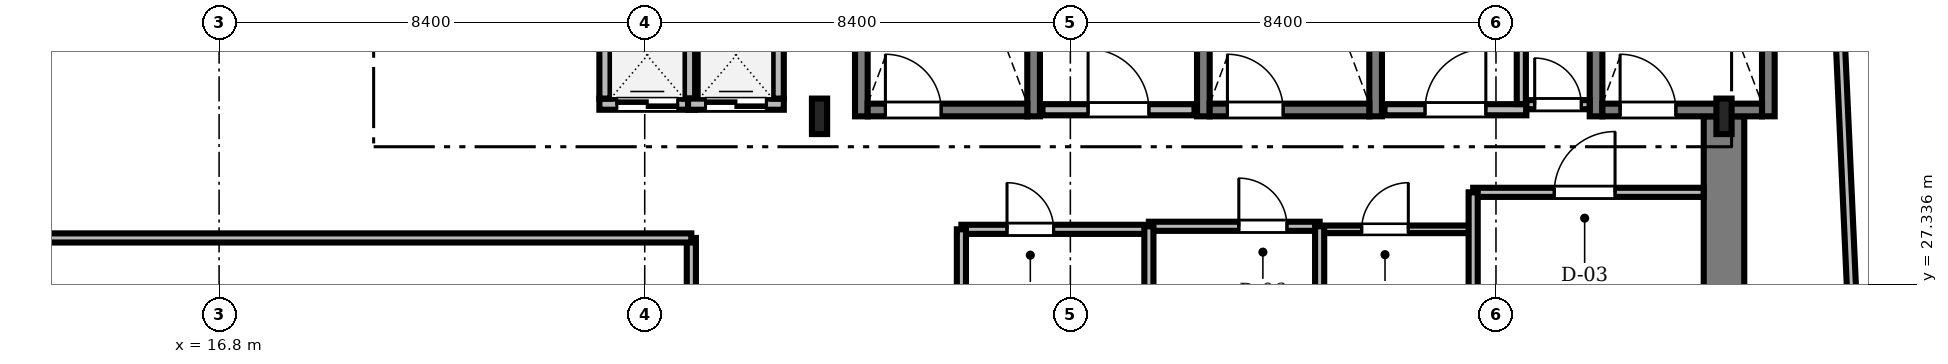
"""IFC4 building model, lengths in metres.
Left out: names, types, materials, properties, quantities, classifications, styles, units other than length and angle.
Written with IfcOpenShell. Run it as: python <this file> out.ifc"""

import sys

from ifc_helpers import new_model, si_unit, direction, frame, frame_2d, origin, origin_2d, place, context, subcontext, project, spatial, rectangle, i_section, extrude, source, transform, mapped, element, fill, save


model = new_model("IFC4")
c1 = context("Model", 3, precision=1e-05, world=origin(), true_north=direction((0.0, 1.0)))
c2 = subcontext(c1, "Body", "Model", "MODEL_VIEW")
j1 = project(units=[si_unit("LENGTHUNIT", "METRE"), si_unit("PLANEANGLEUNIT", "RADIAN")], contexts=[c1])
p1 = place(None, origin())
s1 = spatial("IfcSite", under=j1, at=p1, CompositionType="ELEMENT")
p2 = place(p1, origin())
s2 = spatial("IfcBuilding", under=s1, at=p2, CompositionType="ELEMENT")
p3 = place(p2, frame((0.0, 0.0, 172.2)))
s3 = spatial("IfcBuildingStorey", under=s2, at=p3, CompositionType="ELEMENT", Elevation=172.2)
m1 = source(origin(), c2, "Body", "SweptSolid", [
    extrude(rectangle(XDim=13.15, YDim=0.8, at=frame_2d((6.575, 0.0))), origin(), (0.0, 0.0, 1.0), 4.78),
])
p4 = place(p3, frame((46.5, 17.5, 0.0), z_axis=(0.0, 0.0, 1.0), x_axis=(0.0, 1.0, 0.0)))
e1 = element("IfcWall", 1, at=p4, inside=s3, PredefinedType="SHEAR", context=c2, shape_type="MappedRepresentation", body=[
    mapped(m1, transform((0.0, 0.0, 0.0), scale=1.0)),
])
m2 = source(origin(), c2, "Body", "SweptSolid", [
    extrude(i_section(OverallWidth=0.3, OverallDepth=0.7, WebThickness=0.017, FlangeThickness=0.032, FilletRadius=0.027, at=origin_2d()), origin(), (0.0, 0.0, 1.0), 4.78),
])
for number, where, z_axis, x_axis in (
    (2, (28.65, 30.65, 0.0), (0.0, 0.0, 1.0), (1.0, 0.0, 0.0)),
    (3, (46.5, 30.65, 0.0), (0.0, 0.0, 1.0), (1.0, 0.0, 0.0)),
):
    element("IfcColumn", number, at=place(p3, frame(where, z_axis=z_axis, x_axis=x_axis)), inside=s3, PredefinedType="COLUMN", context=c2, shape_type="MappedRepresentation", body=[
        mapped(m2, transform((0.0, 0.0, 0.0), scale=1.0)),
    ])
m3 = source(origin(), c2, "Body", "SweptSolid", [
    extrude(rectangle(XDim=9.25, YDim=0.25, at=frame_2d((4.625, 0.0))), origin(), (0.0, 0.0, 1.0), 4.8),
])
for number, where, z_axis, x_axis in (
    (4, (29.475, 30.65, 0.0), (0.0, 0.0, 1.0), (0.0, 1.0, 0.0)),
    (5, (32.875, 30.65, 0.0), (0.0, 0.0, 1.0), (0.0, 1.0, 0.0)),
):
    element("IfcWall", number, at=place(p3, frame(where, z_axis=z_axis, x_axis=x_axis)), inside=s3, PredefinedType="SOLIDWALL", context=c2, shape_type="MappedRepresentation", body=[
        mapped(m3, transform((0.0, 0.0, 0.0), scale=1.0)),
    ])
m4 = source(origin(), c2, "Body", "SweptSolid", [
    extrude(rectangle(XDim=3.15, YDim=0.25, at=frame_2d((1.575, 0.0))), origin(), (0.0, 0.0, 1.0), 4.8),
])
p5 = place(p3, frame((29.6, 30.775, 0.0), z_axis=(0.0, 0.0, 1.0), x_axis=(1.0, 0.0, 0.0)))
e6 = element("IfcWall", 6, at=p5, inside=s3, PredefinedType="SOLIDWALL", context=c2, shape_type="MappedRepresentation", body=[
    mapped(m4, transform((0.0, 0.0, 0.0), scale=1.0)),
])
m5 = source(origin(), c2, "Body", "SweptSolid", [
    extrude(rectangle(XDim=1.1, YDim=2.2, at=frame_2d((0.55, 1.1))), frame((0.0, 0.135, 0.0), z_axis=(0.0, -1.0, 0.0), x_axis=(1.0, 0.0, 0.0)), (0.0, 0.0, 1.0), 0.27),
])
p6 = place(p5, frame((0.35, 0.0, 0.0)))
e7 = element("IfcOpeningElement", 7, at=p6, cuts=e6, PredefinedType="OPENING", context=c2, shape_type="MappedRepresentation", body=[
    mapped(m5, transform((0.0, 0.0, 0.0), scale=1.0)),
])
for number, where, z_axis, x_axis in (
    (8, (36.225, 30.65, 0.0), (0.0, 0.0, 1.0), (0.0, 1.0, 0.0)),
    (9, (39.625, 30.65, 0.0), (0.0, 0.0, 1.0), (0.0, 1.0, 0.0)),
):
    element("IfcWall", number, at=place(p3, frame(where, z_axis=z_axis, x_axis=x_axis)), inside=s3, PredefinedType="SOLIDWALL", context=c2, shape_type="MappedRepresentation", body=[
        mapped(m3, transform((0.0, 0.0, 0.0), scale=1.0)),
    ])
p7 = place(p3, frame((36.35, 30.775, 0.0), z_axis=(0.0, 0.0, 1.0), x_axis=(1.0, 0.0, 0.0)))
e10 = element("IfcWall", 10, at=p7, inside=s3, PredefinedType="SOLIDWALL", context=c2, shape_type="MappedRepresentation", body=[
    mapped(m4, transform((0.0, 0.0, 0.0), scale=1.0)),
])
p8 = place(p7, frame((0.35, 0.0, 0.0)))
e11 = element("IfcOpeningElement", 11, at=p8, cuts=e10, PredefinedType="OPENING", context=c2, shape_type="MappedRepresentation", body=[
    mapped(m5, transform((0.0, 0.0, 0.0), scale=1.0)),
])
for number, where, z_axis, x_axis in (
    (12, (43.975, 30.65, 0.0), (0.0, 0.0, 1.0), (0.0, 1.0, 0.0)),
    (13, (47.375, 30.65, 0.0), (0.0, 0.0, 1.0), (0.0, 1.0, 0.0)),
):
    element("IfcWall", number, at=place(p3, frame(where, z_axis=z_axis, x_axis=x_axis)), inside=s3, PredefinedType="SOLIDWALL", context=c2, shape_type="MappedRepresentation", body=[
        mapped(m3, transform((0.0, 0.0, 0.0), scale=1.0)),
    ])
p9 = place(p3, frame((44.1, 30.775, 0.0), z_axis=(0.0, 0.0, 1.0), x_axis=(1.0, 0.0, 0.0)))
e14 = element("IfcWall", 14, at=p9, inside=s3, PredefinedType="SOLIDWALL", context=c2, shape_type="MappedRepresentation", body=[
    mapped(m4, transform((0.0, 0.0, 0.0), scale=1.0)),
])
p10 = place(p9, frame((0.35, 0.0, 0.0)))
e15 = element("IfcOpeningElement", 15, at=p10, cuts=e14, PredefinedType="OPENING", context=c2, shape_type="MappedRepresentation", body=[
    mapped(m5, transform((0.0, 0.0, 0.0), scale=1.0)),
])
m6 = source(origin(), c2, "Body", "SweptSolid", [
    extrude(rectangle(XDim=3.0, YDim=0.22, at=frame_2d((1.5, 0.0))), origin(), (0.0, 0.0, 1.0), 4.78),
])
p11 = place(p3, frame((33.05, 30.78, 0.0), z_axis=(0.0, 0.0, 1.0), x_axis=(1.0, 0.0, 0.0)))
e16 = element("IfcWall", 16, at=p11, inside=s3, PredefinedType="SOLIDWALL", context=c2, shape_type="MappedRepresentation", body=[
    mapped(m6, transform((0.0, 0.0, 0.0), scale=1.0)),
])
m7 = source(origin(), c2, "Body", "SweptSolid", [
    extrude(rectangle(XDim=1.2, YDim=2.2, at=frame_2d((0.6, 1.1))), frame((0.0, 0.12, 0.0), z_axis=(0.0, -1.0, 0.0), x_axis=(1.0, 0.0, 0.0)), (0.0, 0.0, 1.0), 0.24),
])
p12 = place(p11, frame((0.9, 0.0, 0.0)))
e17 = element("IfcOpeningElement", 17, at=p12, cuts=e16, PredefinedType="OPENING", context=c2, shape_type="MappedRepresentation", body=[
    mapped(m7, transform((0.0, 0.0, 0.0), scale=1.0)),
])
m8 = source(origin(), c2, "Body", "SweptSolid", [
    extrude(rectangle(XDim=2.8, YDim=0.22, at=frame_2d((1.4, 0.0))), origin(), (0.0, 0.0, 1.0), 4.78),
])
p13 = place(p3, frame((39.8, 30.78, 0.0), z_axis=(0.0, 0.0, 1.0), x_axis=(1.0, 0.0, 0.0)))
e18 = element("IfcWall", 18, at=p13, inside=s3, PredefinedType="SOLIDWALL", context=c2, shape_type="MappedRepresentation", body=[
    mapped(m8, transform((0.0, 0.0, 0.0), scale=1.0)),
])
p14 = place(p13, frame((0.8, 0.0, 0.0)))
e19 = element("IfcOpeningElement", 19, at=p14, cuts=e18, PredefinedType="OPENING", context=c2, shape_type="MappedRepresentation", body=[
    mapped(m7, transform((0.0, 0.0, 0.0), scale=1.0)),
])
m9 = source(origin(), c2, "Body", "SweptSolid", [
    extrude(rectangle(XDim=1.89, YDim=0.22, at=frame_2d((0.945, 0.0))), origin(), (0.0, 0.0, 1.0), 4.78),
])
p15 = place(p3, frame((24.305, 30.89, 0.0), z_axis=(0.0, 0.0, 1.0), x_axis=(1.0, 0.0, 0.0)))
e20 = element("IfcWall", 20, at=p15, inside=s3, PredefinedType="SOLIDWALL", context=c2, shape_type="MappedRepresentation", body=[
    mapped(m9, transform((0.0, 0.0, 0.0), scale=1.0)),
])
m10 = source(origin(), c2, "Body", "SweptSolid", [
    extrude(rectangle(XDim=1.2, YDim=2.25, at=frame_2d((0.6, 1.125))), frame((0.0, 0.12, 0.0), z_axis=(0.0, -1.0, 0.0), x_axis=(1.0, 0.0, 0.0)), (0.0, 0.0, 1.0), 0.24),
])
p16 = place(p15, frame((0.345, 0.0, 0.0)))
e21 = element("IfcOpeningElement", 21, at=p16, cuts=e20, PredefinedType="OPENING", context=c2, shape_type="MappedRepresentation", body=[
    mapped(m10, transform((0.0, 0.0, 0.0), scale=1.0)),
])
m11 = source(origin(), c2, "Body", "SweptSolid", [
    extrude(rectangle(XDim=1.7, YDim=0.22, at=frame_2d((0.85, 0.0))), origin(), (0.0, 0.0, 1.0), 4.78),
])
for number, where, z_axis, x_axis in (
    (22, (24.415, 31.0, 0.0), (0.0, 0.0, 1.0), (0.0, 1.0, 0.0)),
    (23, (26.085, 31.0, 0.0), (0.0, 0.0, 1.0), (0.0, 1.0, 0.0)),
):
    element("IfcWall", number, at=place(p3, frame(where, z_axis=z_axis, x_axis=x_axis)), inside=s3, PredefinedType="SOLIDWALL", context=c2, shape_type="MappedRepresentation", body=[
        mapped(m11, transform((0.0, 0.0, 0.0), scale=1.0)),
    ])
p17 = place(p3, frame((26.055, 30.89, 0.0), z_axis=(0.0, 0.0, 1.0), x_axis=(1.0, 0.0, 0.0)))
e24 = element("IfcWall", 24, at=p17, inside=s3, PredefinedType="SOLIDWALL", context=c2, shape_type="MappedRepresentation", body=[
    mapped(m9, transform((0.0, 0.0, 0.0), scale=1.0)),
])
p18 = place(p17, frame((0.345, 0.0, 0.0)))
e25 = element("IfcOpeningElement", 25, at=p18, cuts=e24, PredefinedType="OPENING", context=c2, shape_type="MappedRepresentation", body=[
    mapped(m10, transform((0.0, 0.0, 0.0), scale=1.0)),
])
p19 = place(p3, frame((27.835, 31.0, 0.0), z_axis=(0.0, 0.0, 1.0), x_axis=(0.0, 1.0, 0.0)))
e26 = element("IfcWall", 26, at=p19, inside=s3, PredefinedType="SOLIDWALL", context=c2, shape_type="MappedRepresentation", body=[
    mapped(m11, transform((0.0, 0.0, 0.0), scale=1.0)),
])
m12 = source(origin(), c2, "Body", "SweptSolid", [
    extrude(rectangle(XDim=26.557, YDim=0.18, at=frame_2d((13.278, 0.0))), origin(), (0.0, 0.0, 1.0), 4.222),
])
p20 = place(p3, frame((49.6, 14.35, 0.0), z_axis=(0.0, 0.0, 1.0), x_axis=(-0.045193318299, 0.998978260014, 0.0)))
e27 = element("IfcWall", 27, at=p20, inside=s3, PredefinedType="PARTITIONING", context=c2, shape_type="MappedRepresentation", body=[
    mapped(m12, transform((0.0, 0.0, 0.0), scale=1.0)),
])
m13 = source(origin(), c2, "Body", "SweptSolid", [
    extrude(rectangle(XDim=1.8, YDim=2.4, at=frame_2d((0.9, 1.2))), frame((0.0, 0.1, 0.0), z_axis=(0.0, -1.0, 0.0), x_axis=(1.0, 0.0, 0.0)), (0.0, 0.0, 1.0), 0.2),
])
p21 = place(p20, frame((2.4, 0.0, 0.0)))
e28 = element("IfcOpeningElement", 28, at=p21, cuts=e27, PredefinedType="OPENING", context=c2, shape_type="MappedRepresentation", body=[
    mapped(m13, transform((0.0, 0.0, 0.0), scale=1.0)),
])
m14 = source(origin(), c2, "Body", "SweptSolid", [
    extrude(rectangle(XDim=1.05, YDim=2.2, at=frame_2d((0.525, 1.1))), frame((0.0, 0.1, 0.0), z_axis=(0.0, -1.0, 0.0), x_axis=(1.0, 0.0, 0.0)), (0.0, 0.0, 1.0), 0.2),
])
p22 = place(p20, frame((19.2, 0.0, 0.0)))
e29 = element("IfcOpeningElement", 29, at=p22, cuts=e27, PredefinedType="OPENING", context=c2, shape_type="MappedRepresentation", body=[
    mapped(m14, transform((0.0, 0.0, 0.0), scale=1.0)),
])
m15 = source(origin(), c2, "Body", "SweptSolid", [
    extrude(rectangle(XDim=13.9, YDim=0.18, at=frame_2d((6.95, 0.0))), origin(), (0.0, 0.0, 1.0), 4.222),
])
p23 = place(p3, frame((26.12, 14.35, 0.0), z_axis=(0.0, 0.0, 1.0), x_axis=(0.0, 1.0, 0.0)))
e30 = element("IfcWall", 30, at=p23, inside=s3, PredefinedType="PARTITIONING", context=c2, shape_type="MappedRepresentation", body=[
    mapped(m15, transform((0.0, 0.0, 0.0), scale=1.0)),
])
p24 = place(p23, frame((4.2, 0.0, 0.0)))
e31 = element("IfcOpeningElement", 31, at=p24, cuts=e30, PredefinedType="OPENING", context=c2, shape_type="MappedRepresentation", body=[
    mapped(m14, transform((0.0, 0.0, 0.0), scale=1.0)),
])
m16 = source(origin(), c2, "Body", "SweptSolid", [
    extrude(rectangle(XDim=4.548, YDim=0.18, at=frame_2d((2.274, 0.0))), origin(), (0.0, 0.0, 1.0), 4.412),
])
p25 = place(p3, frame((41.55, 29.15, 0.0), z_axis=(0.0, 0.0, 1.0), x_axis=(1.0, 0.0, 0.0)))
e32 = element("IfcWall", 32, at=p25, inside=s3, PredefinedType="PARTITIONING", context=c2, shape_type="MappedRepresentation", body=[
    mapped(m16, transform((0.0, 0.0, 0.0), scale=1.0)),
])
m17 = source(origin(), c2, "Body", "SweptSolid", [
    extrude(rectangle(XDim=1.2, YDim=2.2, at=frame_2d((0.6, 1.1))), frame((0.0, 0.1, 0.0), z_axis=(0.0, -1.0, 0.0), x_axis=(1.0, 0.0, 0.0)), (0.0, 0.0, 1.0), 0.2),
])
p26 = place(p25, frame((1.6, 0.0, 0.0)))
e33 = element("IfcOpeningElement", 33, at=p26, cuts=e32, PredefinedType="OPENING", context=c2, shape_type="MappedRepresentation", body=[
    mapped(m17, transform((0.0, 0.0, 0.0), scale=1.0)),
])
m18 = source(origin(), c2, "Body", "SweptSolid", [
    extrude(rectangle(XDim=3.7, YDim=0.18, at=frame_2d((1.85, 0.0))), origin(), (0.0, 0.0, 1.0), 4.412),
])
p27 = place(p3, frame((31.45, 28.42, 0.0), z_axis=(0.0, 0.0, 1.0), x_axis=(1.0, 0.0, 0.0)))
e34 = element("IfcWall", 34, at=p27, inside=s3, PredefinedType="PARTITIONING", context=c2, shape_type="MappedRepresentation", body=[
    mapped(m18, transform((0.0, 0.0, 0.0), scale=1.0)),
])
m19 = source(origin(), c2, "Body", "SweptSolid", [
    extrude(rectangle(XDim=0.92, YDim=2.1, at=frame_2d((0.46, 1.05))), frame((0.0, 0.1, 0.0), z_axis=(0.0, -1.0, 0.0), x_axis=(1.0, 0.0, 0.0)), (0.0, 0.0, 1.0), 0.2),
])
p28 = place(p27, frame((0.9, 0.0, 0.0)))
e35 = element("IfcOpeningElement", 35, at=p28, cuts=e34, PredefinedType="OPENING", context=c2, shape_type="MappedRepresentation", body=[
    mapped(m19, transform((0.0, 0.0, 0.0), scale=1.0)),
])
m20 = source(origin(), c2, "Body", "SweptSolid", [
    extrude(rectangle(XDim=3.37, YDim=0.18, at=frame_2d((1.685, 0.0))), origin(), (0.0, 0.0, 1.0), 4.78),
])
p29 = place(p3, frame((35.15, 28.48, 0.0), z_axis=(0.0, 0.0, 1.0), x_axis=(1.0, 0.0, 0.0)))
e36 = element("IfcWall", 36, at=p29, inside=s3, PredefinedType="PARTITIONING", context=c2, shape_type="MappedRepresentation", body=[
    mapped(m20, transform((0.0, 0.0, 0.0), scale=1.0)),
])
m21 = source(origin(), c2, "Body", "SweptSolid", [
    extrude(rectangle(XDim=0.95, YDim=2.15, at=frame_2d((0.475, 1.075))), frame((0.0, 0.1, 0.0), z_axis=(0.0, -1.0, 0.0), x_axis=(1.0, 0.0, 0.0)), (0.0, 0.0, 1.0), 0.2),
])
p30 = place(p29, frame((1.775, 0.0, 0.0)))
e37 = element("IfcOpeningElement", 37, at=p30, cuts=e36, PredefinedType="OPENING", context=c2, shape_type="MappedRepresentation", body=[
    mapped(m21, transform((0.0, 0.0, 0.0), scale=1.0)),
])
m22 = source(origin(), c2, "Body", "SweptSolid", [
    extrude(rectangle(XDim=3.0, YDim=0.15, at=frame_2d((1.5, 0.0))), origin(), (0.0, 0.0, 1.0), 4.78),
])
p31 = place(p3, frame((38.52, 28.42, 0.0), z_axis=(0.0, 0.0, 1.0), x_axis=(1.0, 0.0, 0.0)))
e38 = element("IfcWall", 38, at=p31, inside=s3, PredefinedType="PARTITIONING", context=c2, shape_type="MappedRepresentation", body=[
    mapped(m22, transform((0.0, 0.0, 0.0), scale=1.0)),
])
m23 = source(origin(), c2, "Body", "SweptSolid", [
    extrude(rectangle(XDim=0.92, YDim=2.1, at=frame_2d((0.46, 1.05))), frame((0.0, 0.085, 0.0), z_axis=(0.0, -1.0, 0.0), x_axis=(1.0, 0.0, 0.0)), (0.0, 0.0, 1.0), 0.17),
])
p32 = place(p31, frame((0.83, 0.0, 0.0)))
e39 = element("IfcOpeningElement", 39, at=p32, cuts=e38, PredefinedType="OPENING", context=c2, shape_type="MappedRepresentation", body=[
    mapped(m23, transform((0.0, 0.0, 0.0), scale=1.0)),
])
m24 = source(origin(), c2, "Body", "SweptSolid", [
    extrude(rectangle(XDim=1.248, YDim=0.18, at=frame_2d((0.624, 0.0))), origin(), (0.0, 0.0, 1.0), 4.78),
])
p33 = place(p3, frame((42.6, 30.88, 0.0), z_axis=(0.0, 0.0, 1.0), x_axis=(1.0, 0.0, 0.0)))
e40 = element("IfcWall", 40, at=p33, inside=s3, PredefinedType="PARTITIONING", context=c2, shape_type="MappedRepresentation", body=[
    mapped(m24, transform((0.0, 0.0, 0.0), scale=1.0)),
])
p34 = place(p33, frame((0.164, 0.0, 0.0)))
e41 = element("IfcOpeningElement", 41, at=p34, cuts=e40, PredefinedType="OPENING", context=c2, shape_type="MappedRepresentation", body=[
    mapped(m19, transform((0.0, 0.0, 0.0), scale=1.0)),
])
m25 = source(origin(), c2, "Body", "SweptSolid", [
    extrude(rectangle(XDim=14.9, YDim=0.18, at=frame_2d((7.45, 0.0))), origin(), (0.0, 0.0, 1.0), 4.022),
])
p35 = place(p3, frame((11.22, 28.25, 0.0), z_axis=(0.0, 0.0, 1.0), x_axis=(1.0, 0.0, 0.0)))
e42 = element("IfcWall", 42, at=p35, inside=s3, PredefinedType="PARTITIONING", context=c2, shape_type="MappedRepresentation", body=[
    mapped(m25, transform((0.0, 0.0, 0.0), scale=1.0)),
])
m26 = source(origin(), c2, "Body", "SweptSolid", [
    extrude(rectangle(XDim=2.35, YDim=0.18, at=frame_2d((1.175, 0.0))), origin(), (0.0, 0.0, 1.0), 4.222),
])
p36 = place(p3, frame((41.55, 26.8, 0.0), z_axis=(0.0, 0.0, 1.0), x_axis=(0.0, 1.0, 0.0)))
e43 = element("IfcWall", 43, at=p36, inside=s3, PredefinedType="PARTITIONING", context=c2, shape_type="MappedRepresentation", body=[
    mapped(m26, transform((0.0, 0.0, 0.0), scale=1.0)),
])
m27 = source(origin(), c2, "Body", "SweptSolid", [
    extrude(rectangle(XDim=1.858, YDim=0.18, at=frame_2d((0.929, 0.0))), origin(), (0.0, 0.0, 1.0), 4.78),
])
p37 = place(p3, frame((42.5, 30.892, 0.0), z_axis=(0.0, 0.0, 1.0), x_axis=(0.0, 1.0, 0.0)))
e44 = element("IfcWall", 44, at=p37, inside=s3, PredefinedType="PARTITIONING", context=c2, shape_type="MappedRepresentation", body=[
    mapped(m27, transform((0.0, 0.0, 0.0), scale=1.0)),
])
m28 = source(origin(), c2, "Body", "SweptSolid", [
    extrude(rectangle(XDim=1.66, YDim=0.18, at=frame_2d((0.83, 0.0))), origin(), (0.0, 0.0, 1.0), 4.322),
])
for number, where, z_axis, x_axis in (
    (45, (35.15, 26.82, 0.0), (0.0, 0.0, 1.0), (0.0, 1.0, 0.0)),
    (46, (38.52, 26.82, 0.0), (0.0, 0.0, 1.0), (0.0, 1.0, 0.0)),
):
    element("IfcWall", number, at=place(p3, frame(where, z_axis=z_axis, x_axis=x_axis)), inside=s3, PredefinedType="PARTITIONING", context=c2, shape_type="MappedRepresentation", body=[
        mapped(m28, transform((0.0, 0.0, 0.0), scale=1.0)),
    ])
m29 = source(origin(), c2, "Body", "SweptSolid", [
    extrude(rectangle(XDim=1.6, YDim=0.18, at=frame_2d((0.8, 0.0))), origin(), (0.0, 0.0, 1.0), 4.322),
])
p38 = place(p3, frame((31.45, 26.82, 0.0), z_axis=(0.0, 0.0, 1.0), x_axis=(0.0, 1.0, 0.0)))
e47 = element("IfcWall", 47, at=p38, inside=s3, PredefinedType="PARTITIONING", context=c2, shape_type="MappedRepresentation", body=[
    mapped(m29, transform((0.0, 0.0, 0.0), scale=1.0)),
])
m30 = source(origin(), c2, "Body", "SweptSolid", [
    extrude(rectangle(XDim=1.1, YDim=2.2, at=frame_2d((0.55, 1.1))), frame((0.0, 0.025, 0.0), z_axis=(0.0, -1.0, 0.0), x_axis=(1.0, 0.0, 0.0)), (0.0, 0.0, 1.0), 0.05),
])
p39 = place(p6, origin())
e48 = element("IfcDoor", 48, at=p39, inside=s3, OperationType="SINGLE_SWING_LEFT", PredefinedType="DOOR", context=c2, shape_type="MappedRepresentation", body=[
    mapped(m30, transform((0.0, 0.0, 0.0), scale=1.0)),
])
fill(e7, e48)
p40 = place(p8, origin())
e49 = element("IfcDoor", 49, at=p40, inside=s3, OperationType="SINGLE_SWING_LEFT", PredefinedType="DOOR", context=c2, shape_type="MappedRepresentation", body=[
    mapped(m30, transform((0.0, 0.0, 0.0), scale=1.0)),
])
fill(e11, e49)
p41 = place(p10, origin())
e50 = element("IfcDoor", 50, at=p41, inside=s3, OperationType="SINGLE_SWING_LEFT", PredefinedType="DOOR", context=c2, shape_type="MappedRepresentation", body=[
    mapped(m30, transform((0.0, 0.0, 0.0), scale=1.0)),
])
fill(e15, e50)
m31 = source(origin(), c2, "Body", "SweptSolid", [
    extrude(rectangle(XDim=1.2, YDim=2.2, at=frame_2d((0.6, 1.1))), frame((0.0, 0.025, 0.0), z_axis=(0.0, -1.0, 0.0), x_axis=(1.0, 0.0, 0.0)), (0.0, 0.0, 1.0), 0.05),
])
p42 = place(p12, origin())
e51 = element("IfcDoor", 51, at=p42, inside=s3, OperationType="SINGLE_SWING_LEFT", PredefinedType="DOOR", context=c2, shape_type="MappedRepresentation", body=[
    mapped(m31, transform((0.0, 0.0, 0.0), scale=1.0)),
])
fill(e17, e51)
p43 = place(p14, origin())
e52 = element("IfcDoor", 52, at=p43, inside=s3, OperationType="SINGLE_SWING_RIGHT", PredefinedType="DOOR", context=c2, shape_type="MappedRepresentation", body=[
    mapped(m31, transform((0.0, 0.0, 0.0), scale=1.0)),
])
fill(e19, e52)
m32 = source(origin(), c2, "Body", "SweptSolid", [
    extrude(rectangle(XDim=1.2, YDim=2.25, at=frame_2d((0.6, 1.125))), frame((0.0, 0.025, 0.0), z_axis=(0.0, -1.0, 0.0), x_axis=(1.0, 0.0, 0.0)), (0.0, 0.0, 1.0), 0.05),
])
p44 = place(p16, origin())
e53 = element("IfcDoor", 53, at=p44, inside=s3, OperationType="DOUBLE_DOOR_SLIDING", PredefinedType="DOOR", context=c2, shape_type="MappedRepresentation", body=[
    mapped(m32, transform((0.0, 0.0, 0.0), scale=1.0)),
])
fill(e21, e53)
p45 = place(p18, origin())
e54 = element("IfcDoor", 54, at=p45, inside=s3, OperationType="DOUBLE_DOOR_SLIDING", PredefinedType="DOOR", context=c2, shape_type="MappedRepresentation", body=[
    mapped(m32, transform((0.0, 0.0, 0.0), scale=1.0)),
])
fill(e25, e54)
p46 = place(p26, origin())
e55 = element("IfcDoor", 55, at=p46, inside=s3, OperationType="SINGLE_SWING_RIGHT", PredefinedType="DOOR", context=c2, shape_type="MappedRepresentation", body=[
    mapped(m31, transform((0.0, 0.0, 0.0), scale=1.0)),
])
fill(e33, e55)
m33 = source(origin(), c2, "Body", "SweptSolid", [
    extrude(rectangle(XDim=0.92, YDim=2.1, at=frame_2d((0.46, 1.05))), frame((0.0, 0.025, 0.0), z_axis=(0.0, -1.0, 0.0), x_axis=(1.0, 0.0, 0.0)), (0.0, 0.0, 1.0), 0.05),
])
p47 = place(p28, origin())
e56 = element("IfcDoor", 56, at=p47, inside=s3, OperationType="SINGLE_SWING_LEFT", PredefinedType="DOOR", context=c2, shape_type="MappedRepresentation", body=[
    mapped(m33, transform((0.0, 0.0, 0.0), scale=1.0)),
])
fill(e35, e56)
m34 = source(origin(), c2, "Body", "SweptSolid", [
    extrude(rectangle(XDim=0.95, YDim=2.15, at=frame_2d((0.475, 1.075))), frame((0.0, 0.025, 0.0), z_axis=(0.0, -1.0, 0.0), x_axis=(1.0, 0.0, 0.0)), (0.0, 0.0, 1.0), 0.05),
])
p48 = place(p30, origin())
e57 = element("IfcDoor", 57, at=p48, inside=s3, OperationType="SINGLE_SWING_LEFT", PredefinedType="DOOR", context=c2, shape_type="MappedRepresentation", body=[
    mapped(m34, transform((0.0, 0.0, 0.0), scale=1.0)),
])
fill(e37, e57)
p49 = place(p32, origin())
e58 = element("IfcDoor", 58, at=p49, inside=s3, OperationType="SINGLE_SWING_RIGHT", PredefinedType="DOOR", context=c2, shape_type="MappedRepresentation", body=[
    mapped(m33, transform((0.0, 0.0, 0.0), scale=1.0)),
])
fill(e39, e58)
p50 = place(p34, origin())
e59 = element("IfcDoor", 59, at=p50, inside=s3, OperationType="SINGLE_SWING_LEFT", PredefinedType="DOOR", context=c2, shape_type="MappedRepresentation", body=[
    mapped(m33, transform((0.0, 0.0, 0.0), scale=1.0)),
])
fill(e41, e59)
save(model, sys.argv[1])
